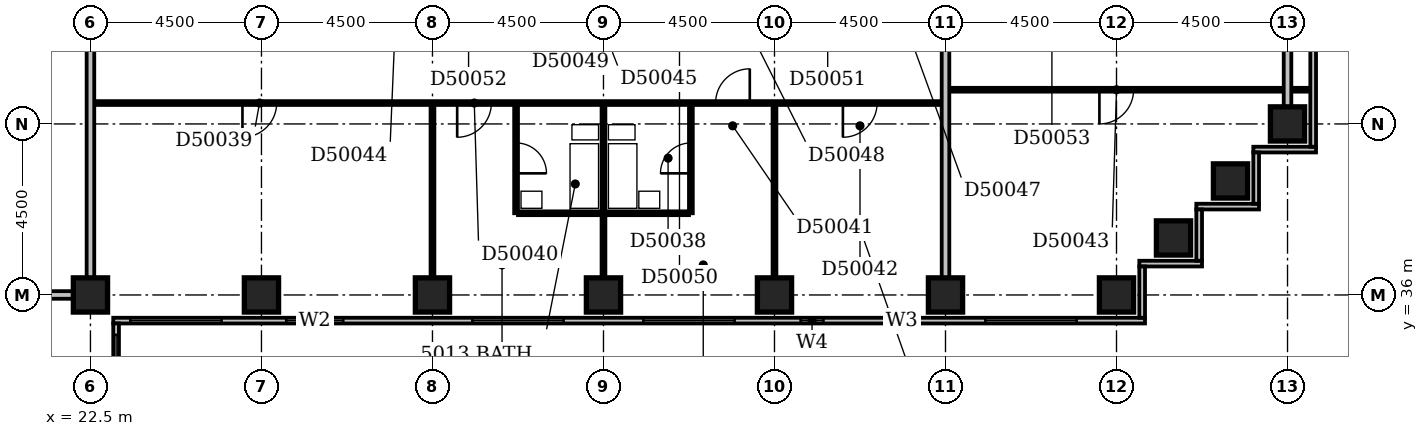
"""IFC4 building model, lengths in metres.
Left out: names, types, materials, properties, quantities, classifications, styles, units other than length and angle.
Written with IfcOpenShell. Run it as: python <this file> out.ifc"""

import sys

from ifc_helpers import new_model, si_unit, direction, frame, frame_2d, origin, origin_2d, place, context, subcontext, project, spatial, rectangle, extrude, element, fill, save


model = new_model("IFC4")
c1 = context("Model", 3, precision=1e-05, world=origin(), true_north=direction((0.0, 1.0)))
c2 = subcontext(c1, "Body", "Model", "MODEL_VIEW")
j1 = project(units=[si_unit("LENGTHUNIT", "METRE"), si_unit("PLANEANGLEUNIT", "RADIAN")], contexts=[c1])
p1 = place(None, origin())
s1 = spatial("IfcSite", under=j1, at=p1, CompositionType="ELEMENT")
p2 = place(p1, origin())
s2 = spatial("IfcBuilding", under=s1, at=p2, CompositionType="ELEMENT")
p3 = place(p2, frame((0.0, 0.0, 197.0)))
s3 = spatial("IfcBuildingStorey", under=s2, at=p3, CompositionType="ELEMENT", Elevation=197.0)
for number, where, z_axis, x_axis in (
    (1, (22.5, 36.0, -0.3), (0.0, 0.0, 1.0), (1.0, 0.0, 0.0)),
    (2, (27.0, 36.0, -0.3), (0.0, 0.0, 1.0), (1.0, 0.0, 0.0)),
    (3, (31.5, 36.0, -0.3), (0.0, 0.0, 1.0), (1.0, 0.0, 0.0)),
    (4, (36.0, 36.0, -0.3), (0.0, 0.0, 1.0), (1.0, 0.0, 0.0)),
    (5, (40.5, 36.0, -0.3), (0.0, 0.0, 1.0), (1.0, 0.0, 0.0)),
    (6, (45.0, 36.0, -0.3), (0.0, 0.0, 1.0), (1.0, 0.0, 0.0)),
    (7, (49.5, 36.0, -0.3), (0.0, 0.0, 1.0), (1.0, 0.0, 0.0)),
    (8, (51.0, 37.5, -0.3), (0.0, 0.0, 1.0), (1.0, 0.0, 0.0)),
    (9, (52.5, 39.0, -0.3), (0.0, 0.0, 1.0), (1.0, 0.0, 0.0)),
    (10, (54.0, 40.5, -0.3), (0.0, 0.0, 1.0), (1.0, 0.0, 0.0)),
):
    element("IfcColumn", number, at=place(p3, frame(where, z_axis=z_axis, x_axis=x_axis)), inside=s3, PredefinedType="COLUMN", context=c2, shape_type="SweptSolid", body=[
        extrude(rectangle(XDim=0.9, YDim=0.9, at=origin_2d()), origin(), (0.0, 0.0, 1.0), 3.6),
    ])
p4 = place(p3, frame((23.175, 17.4, 0.0), z_axis=(0.0, 0.0, 1.0), x_axis=(0.0, 1.0, 0.0)))
e11 = element("IfcWall", 11, at=p4, inside=s3, PredefinedType="STANDARD", context=c2, shape_type="SweptSolid", body=[
    extrude(rectangle(XDim=17.85, YDim=0.15, at=frame_2d((8.925, 0.0))), origin(), (0.0, 0.0, 1.0), 2.7),
])
p5 = place(p4, frame((1.65, 0.0, 0.6)))
e12 = element("IfcOpeningElement", 12, at=p5, cuts=e11, PredefinedType="OPENING", context=c2, shape_type="SweptSolid", body=[
    extrude(rectangle(XDim=2.4, YDim=1.8, at=frame_2d((1.2, 0.9))), frame((0.0, 0.087, 0.0), z_axis=(0.0, -1.0, 0.0), x_axis=(1.0, 0.0, 0.0)), (0.0, 0.0, 1.0), 0.174),
])
p6 = place(p4, frame((5.885, 0.0, 0.6)))
e13 = element("IfcOpeningElement", 13, at=p6, cuts=e11, PredefinedType="OPENING", context=c2, shape_type="SweptSolid", body=[
    extrude(rectangle(XDim=2.4, YDim=1.8, at=frame_2d((1.2, 0.9))), frame((0.0, 0.087, 0.0), z_axis=(0.0, -1.0, 0.0), x_axis=(1.0, 0.0, 0.0)), (0.0, 0.0, 1.0), 0.174),
])
p7 = place(p4, frame((10.65, 0.0, 0.6)))
e14 = element("IfcOpeningElement", 14, at=p7, cuts=e11, PredefinedType="OPENING", context=c2, shape_type="SweptSolid", body=[
    extrude(rectangle(XDim=2.4, YDim=1.8, at=frame_2d((1.2, 0.9))), frame((0.0, 0.087, 0.0), z_axis=(0.0, -1.0, 0.0), x_axis=(1.0, 0.0, 0.0)), (0.0, 0.0, 1.0), 0.174),
])
p8 = place(p4, frame((15.15, 0.0, 0.6)))
e15 = element("IfcOpeningElement", 15, at=p8, cuts=e11, PredefinedType="OPENING", context=c2, shape_type="SweptSolid", body=[
    extrude(rectangle(XDim=2.4, YDim=1.8, at=frame_2d((1.2, 0.9))), frame((0.0, 0.087, 0.0), z_axis=(0.0, -1.0, 0.0), x_axis=(1.0, 0.0, 0.0)), (0.0, 0.0, 1.0), 0.174),
])
p9 = place(p3, frame((23.1, 35.325, 0.0), z_axis=(0.0, 0.0, 1.0), x_axis=(1.0, 0.0, 0.0)))
e16 = element("IfcWall", 16, at=p9, inside=s3, PredefinedType="STANDARD", context=c2, shape_type="SweptSolid", body=[
    extrude(rectangle(XDim=27.15, YDim=0.15, at=frame_2d((13.575, 0.0))), origin(), (0.0, 0.0, 1.0), 2.7),
])
p10 = place(p9, frame((0.45, 0.0, 0.6)))
e17 = element("IfcOpeningElement", 17, at=p10, cuts=e16, PredefinedType="OPENING", context=c2, shape_type="SweptSolid", body=[
    extrude(rectangle(XDim=2.4, YDim=1.8, at=frame_2d((1.2, 0.9))), frame((0.0, 0.087, 0.0), z_axis=(0.0, -1.0, 0.0), x_axis=(1.0, 0.0, 0.0)), (0.0, 0.0, 1.0), 0.174),
])
p11 = place(p9, frame((4.552, 0.0, 0.6)))
e18 = element("IfcOpeningElement", 18, at=p11, cuts=e16, PredefinedType="OPENING", context=c2, shape_type="SweptSolid", body=[
    extrude(rectangle(XDim=1.5, YDim=1.8, at=frame_2d((0.75, 0.9))), frame((0.0, 0.087, 0.0), z_axis=(0.0, -1.0, 0.0), x_axis=(1.0, 0.0, 0.0)), (0.0, 0.0, 1.0), 0.174),
])
p12 = place(p9, frame((9.45, 0.0, 0.6)))
e19 = element("IfcOpeningElement", 19, at=p12, cuts=e16, PredefinedType="OPENING", context=c2, shape_type="SweptSolid", body=[
    extrude(rectangle(XDim=2.4, YDim=1.8, at=frame_2d((1.2, 0.9))), frame((0.0, 0.087, 0.0), z_axis=(0.0, -1.0, 0.0), x_axis=(1.0, 0.0, 0.0)), (0.0, 0.0, 1.0), 0.174),
])
p13 = place(p9, frame((13.95, 0.0, 0.6)))
e20 = element("IfcOpeningElement", 20, at=p13, cuts=e16, PredefinedType="OPENING", context=c2, shape_type="SweptSolid", body=[
    extrude(rectangle(XDim=2.4, YDim=1.8, at=frame_2d((1.2, 0.9))), frame((0.0, 0.087, 0.0), z_axis=(0.0, -1.0, 0.0), x_axis=(1.0, 0.0, 0.0)), (0.0, 0.0, 1.0), 0.174),
])
p14 = place(p9, frame((18.088, 0.0, 0.6)))
e21 = element("IfcOpeningElement", 21, at=p14, cuts=e16, PredefinedType="OPENING", context=c2, shape_type="SweptSolid", body=[
    extrude(rectangle(XDim=0.6, YDim=1.8, at=frame_2d((0.3, 0.9))), frame((0.0, 0.087, 0.0), z_axis=(0.0, -1.0, 0.0), x_axis=(1.0, 0.0, 0.0)), (0.0, 0.0, 1.0), 0.174),
])
p15 = place(p9, frame((20.301, 0.0, 0.6)))
e22 = element("IfcOpeningElement", 22, at=p15, cuts=e16, PredefinedType="OPENING", context=c2, shape_type="SweptSolid", body=[
    extrude(rectangle(XDim=0.9, YDim=1.8, at=frame_2d((0.45, 0.9))), frame((0.0, 0.087, 0.0), z_axis=(0.0, -1.0, 0.0), x_axis=(1.0, 0.0, 0.0)), (0.0, 0.0, 1.0), 0.174),
])
p16 = place(p9, frame((22.95, 0.0, 0.6)))
e23 = element("IfcOpeningElement", 23, at=p16, cuts=e16, PredefinedType="OPENING", context=c2, shape_type="SweptSolid", body=[
    extrude(rectangle(XDim=2.4, YDim=1.8, at=frame_2d((1.2, 0.9))), frame((0.0, 0.087, 0.0), z_axis=(0.0, -1.0, 0.0), x_axis=(1.0, 0.0, 0.0)), (0.0, 0.0, 1.0), 0.174),
])
p17 = place(p3, frame((50.175, 35.4, 0.0), z_axis=(0.0, 0.0, 1.0), x_axis=(0.0, 1.0, 0.0)))
e24 = element("IfcWall", 24, at=p17, inside=s3, PredefinedType="STANDARD", context=c2, shape_type="SweptSolid", body=[
    extrude(rectangle(XDim=1.35, YDim=0.15, at=frame_2d((0.675, 0.0))), origin(), (0.0, 0.0, 1.0), 2.7),
])
p18 = place(p3, frame((50.1, 36.825, 0.0), z_axis=(0.0, 0.0, 1.0), x_axis=(1.0, 0.0, 0.0)))
e25 = element("IfcWall", 25, at=p18, inside=s3, PredefinedType="STANDARD", context=c2, shape_type="SweptSolid", body=[
    extrude(rectangle(XDim=1.65, YDim=0.15, at=frame_2d((0.825, 0.0))), origin(), (0.0, 0.0, 1.0), 2.7),
])
p19 = place(p3, frame((51.675, 36.9, 0.0), z_axis=(0.0, 0.0, 1.0), x_axis=(0.0, 1.0, 0.0)))
e26 = element("IfcWall", 26, at=p19, inside=s3, PredefinedType="STANDARD", context=c2, shape_type="SweptSolid", body=[
    extrude(rectangle(XDim=1.35, YDim=0.15, at=frame_2d((0.675, 0.0))), origin(), (0.0, 0.0, 1.0), 2.7),
])
p20 = place(p3, frame((51.6, 38.325, 0.0), z_axis=(0.0, 0.0, 1.0), x_axis=(1.0, 0.0, 0.0)))
e27 = element("IfcWall", 27, at=p20, inside=s3, PredefinedType="STANDARD", context=c2, shape_type="SweptSolid", body=[
    extrude(rectangle(XDim=1.65, YDim=0.15, at=frame_2d((0.825, 0.0))), origin(), (0.0, 0.0, 1.0), 2.7),
])
p21 = place(p3, frame((53.175, 38.4, 0.0), z_axis=(0.0, 0.0, 1.0), x_axis=(0.0, 1.0, 0.0)))
e28 = element("IfcWall", 28, at=p21, inside=s3, PredefinedType="STANDARD", context=c2, shape_type="SweptSolid", body=[
    extrude(rectangle(XDim=1.35, YDim=0.15, at=frame_2d((0.675, 0.0))), origin(), (0.0, 0.0, 1.0), 2.7),
])
p22 = place(p3, frame((53.1, 39.825, 0.0), z_axis=(0.0, 0.0, 1.0), x_axis=(1.0, 0.0, 0.0)))
e29 = element("IfcWall", 29, at=p22, inside=s3, PredefinedType="STANDARD", context=c2, shape_type="SweptSolid", body=[
    extrude(rectangle(XDim=1.65, YDim=0.15, at=frame_2d((0.825, 0.0))), origin(), (0.0, 0.0, 1.0), 2.7),
])
p23 = place(p3, frame((54.675, 39.9, 0.0), z_axis=(0.0, 0.0, 1.0), x_axis=(0.0, 1.0, 0.0)))
e30 = element("IfcWall", 30, at=p23, inside=s3, PredefinedType="STANDARD", context=c2, shape_type="SweptSolid", body=[
    extrude(rectangle(XDim=14.85, YDim=0.15, at=frame_2d((7.425, 0.0))), origin(), (0.0, 0.0, 1.0), 2.7),
])
p24 = place(p23, frame((5.848, 0.0, 0.6)))
e31 = element("IfcOpeningElement", 31, at=p24, cuts=e30, PredefinedType="OPENING", context=c2, shape_type="SweptSolid", body=[
    extrude(rectangle(XDim=0.6, YDim=1.8, at=frame_2d((0.3, 0.9))), frame((0.0, 0.087, 0.0), z_axis=(0.0, -1.0, 0.0), x_axis=(1.0, 0.0, 0.0)), (0.0, 0.0, 1.0), 0.174),
])
p25 = place(p23, frame((8.226, 0.0, 0.6)))
e32 = element("IfcOpeningElement", 32, at=p25, cuts=e30, PredefinedType="OPENING", context=c2, shape_type="SweptSolid", body=[
    extrude(rectangle(XDim=0.6, YDim=1.8, at=frame_2d((0.3, 0.9))), frame((0.0, 0.087, 0.0), z_axis=(0.0, -1.0, 0.0), x_axis=(1.0, 0.0, 0.0)), (0.0, 0.0, 1.0), 0.174),
])
p26 = place(p3, frame((9.1, 36.0, 0.0), z_axis=(0.0, 0.0, 1.0), x_axis=(1.0, 0.0, 0.0)))
e33 = element("IfcWall", 33, at=p26, inside=s3, PredefinedType="PARTITIONING", context=c2, shape_type="SweptSolid", body=[
    extrude(rectangle(XDim=12.95, YDim=0.2, at=frame_2d((6.475, 0.0))), origin(), (0.0, 0.0, 1.0), 3.3),
])
p27 = place(p3, frame((22.5, 36.45, 0.0), z_axis=(0.0, 0.0, 1.0), x_axis=(0.0, 1.0, 0.0)))
e34 = element("IfcWall", 34, at=p27, inside=s3, PredefinedType="PARTITIONING", context=c2, shape_type="SweptSolid", body=[
    extrude(rectangle(XDim=13.05, YDim=0.2, at=frame_2d((6.525, 0.0))), origin(), (0.0, 0.0, 1.0), 3.3),
])
p28 = place(p3, frame((31.5, 36.45, 0.0), z_axis=(0.0, 0.0, 1.0), x_axis=(0.0, 1.0, 0.0)))
e35 = element("IfcWall", 35, at=p28, inside=s3, PredefinedType="PARTITIONING", context=c2, shape_type="SweptSolid", body=[
    extrude(rectangle(XDim=4.55, YDim=0.1, at=frame_2d((2.275, 0.0))), origin(), (0.0, 0.0, 1.0), 3.3),
])
p29 = place(p3, frame((36.0, 36.45, 0.0), z_axis=(0.0, 0.0, 1.0), x_axis=(0.0, 1.0, 0.0)))
e36 = element("IfcWall", 36, at=p29, inside=s3, PredefinedType="PARTITIONING", context=c2, shape_type="SweptSolid", body=[
    extrude(rectangle(XDim=4.55, YDim=0.1, at=frame_2d((2.275, 0.0))), origin(), (0.0, 0.0, 1.0), 2.4),
])
p30 = place(p3, frame((40.5, 36.45, 0.0), z_axis=(0.0, 0.0, 1.0), x_axis=(0.0, 1.0, 0.0)))
e37 = element("IfcWall", 37, at=p30, inside=s3, PredefinedType="PARTITIONING", context=c2, shape_type="SweptSolid", body=[
    extrude(rectangle(XDim=4.55, YDim=0.1, at=frame_2d((2.275, 0.0))), origin(), (0.0, 0.0, 1.0), 3.3),
])
p31 = place(p3, frame((45.0, 36.45, 0.0), z_axis=(0.0, 0.0, 1.0), x_axis=(0.0, 1.0, 0.0)))
e38 = element("IfcWall", 38, at=p31, inside=s3, PredefinedType="PARTITIONING", context=c2, shape_type="SweptSolid", body=[
    extrude(rectangle(XDim=12.95, YDim=0.2, at=frame_2d((6.475, 0.0))), origin(), (0.0, 0.0, 1.0), 2.6),
])
p32 = place(p3, frame((33.7, 38.15, 0.0), z_axis=(0.0, 0.0, 1.0), x_axis=(0.0, 1.0, 0.0)))
e39 = element("IfcWall", 39, at=p32, inside=s3, PredefinedType="PLUMBINGWALL", context=c2, shape_type="SweptSolid", body=[
    extrude(rectangle(XDim=2.85, YDim=0.1, at=frame_2d((1.425, 0.0))), origin(), (0.0, 0.0, 1.0), 3.3),
])
p33 = place(p32, frame((1.05, 0.0, 0.0)))
e40 = element("IfcOpeningElement", 40, at=p33, cuts=e39, PredefinedType="OPENING", context=c2, shape_type="SweptSolid", body=[
    extrude(rectangle(XDim=0.8, YDim=2.1, at=frame_2d((0.4, 1.05))), frame((0.0, 0.062, 0.0), z_axis=(0.0, -1.0, 0.0), x_axis=(1.0, 0.0, 0.0)), (0.0, 0.0, 1.0), 0.124),
])
p34 = place(p3, frame((33.75, 38.15, 0.0), z_axis=(0.0, 0.0, 1.0), x_axis=(1.0, 0.0, 0.0)))
e41 = element("IfcWall", 41, at=p34, inside=s3, PredefinedType="PLUMBINGWALL", context=c2, shape_type="SweptSolid", body=[
    extrude(rectangle(XDim=4.5, YDim=0.1, at=frame_2d((2.25, 0.0))), origin(), (0.0, 0.0, 1.0), 3.3),
])
p35 = place(p3, frame((38.3, 38.15, 0.0), z_axis=(0.0, 0.0, 1.0), x_axis=(0.0, 1.0, 0.0)))
e42 = element("IfcWall", 42, at=p35, inside=s3, PredefinedType="PLUMBINGWALL", context=c2, shape_type="SweptSolid", body=[
    extrude(rectangle(XDim=2.85, YDim=0.1, at=frame_2d((1.425, 0.0))), origin(), (0.0, 0.0, 1.0), 3.3),
])
p36 = place(p35, frame((1.05, 0.0, 0.0)))
e43 = element("IfcOpeningElement", 43, at=p36, cuts=e42, PredefinedType="OPENING", context=c2, shape_type="SweptSolid", body=[
    extrude(rectangle(XDim=0.8, YDim=2.1, at=frame_2d((0.4, 1.05))), frame((0.0, 0.062, 0.0), z_axis=(0.0, -1.0, 0.0), x_axis=(1.0, 0.0, 0.0)), (0.0, 0.0, 1.0), 0.124),
])
p37 = place(p3, frame((54.0, 40.95, 0.0), z_axis=(0.0, 0.0, 1.0), x_axis=(0.0, 1.0, 0.0)))
e44 = element("IfcWall", 44, at=p37, inside=s3, PredefinedType="PARTITIONING", context=c2, shape_type="SweptSolid", body=[
    extrude(rectangle(XDim=8.1, YDim=0.2, at=frame_2d((4.05, 0.0))), origin(), (0.0, 0.0, 1.0), 2.7),
])
p38 = place(p3, frame((22.6, 41.05, 0.0), z_axis=(0.0, 0.0, 1.0), x_axis=(1.0, 0.0, 0.0)))
e45 = element("IfcWall", 45, at=p38, inside=s3, PredefinedType="PARTITIONING", context=c2, shape_type="SweptSolid", body=[
    extrude(rectangle(XDim=22.3, YDim=0.1, at=frame_2d((11.15, 0.0))), origin(), (0.0, 0.0, 1.0), 3.3),
])
p39 = place(p38, frame((3.9, 0.0, 0.0)))
e46 = element("IfcOpeningElement", 46, at=p39, cuts=e45, PredefinedType="OPENING", context=c2, shape_type="SweptSolid", body=[
    extrude(rectangle(XDim=0.9, YDim=2.1, at=frame_2d((0.45, 1.05))), frame((0.0, 0.062, 0.0), z_axis=(0.0, -1.0, 0.0), x_axis=(1.0, 0.0, 0.0)), (0.0, 0.0, 1.0), 0.124),
])
p40 = place(p38, frame((9.55, 0.0, 0.0)))
e47 = element("IfcOpeningElement", 47, at=p40, cuts=e45, PredefinedType="OPENING", context=c2, shape_type="SweptSolid", body=[
    extrude(rectangle(XDim=0.9, YDim=2.1, at=frame_2d((0.45, 1.05))), frame((0.0, 0.062, 0.0), z_axis=(0.0, -1.0, 0.0), x_axis=(1.0, 0.0, 0.0)), (0.0, 0.0, 1.0), 0.124),
])
p41 = place(p38, frame((16.35, 0.0, 0.0)))
e48 = element("IfcOpeningElement", 48, at=p41, cuts=e45, PredefinedType="OPENING", context=c2, shape_type="SweptSolid", body=[
    extrude(rectangle(XDim=0.9, YDim=2.1, at=frame_2d((0.45, 1.05))), frame((0.0, 0.062, 0.0), z_axis=(0.0, -1.0, 0.0), x_axis=(1.0, 0.0, 0.0)), (0.0, 0.0, 1.0), 0.124),
])
p42 = place(p38, frame((19.7, 0.0, 0.0)))
e49 = element("IfcOpeningElement", 49, at=p42, cuts=e45, PredefinedType="OPENING", context=c2, shape_type="SweptSolid", body=[
    extrude(rectangle(XDim=0.9, YDim=2.1, at=frame_2d((0.45, 1.05))), frame((0.0, 0.062, 0.0), z_axis=(0.0, -1.0, 0.0), x_axis=(1.0, 0.0, 0.0)), (0.0, 0.0, 1.0), 0.124),
])
p43 = place(p3, frame((45.1, 41.4, 0.0), z_axis=(0.0, 0.0, 1.0), x_axis=(1.0, 0.0, 0.0)))
e50 = element("IfcWall", 50, at=p43, inside=s3, PredefinedType="PARTITIONING", context=c2, shape_type="SweptSolid", body=[
    extrude(rectangle(XDim=9.5, YDim=0.1, at=frame_2d((4.75, 0.0))), origin(), (0.0, 0.0, 1.0), 3.3),
])
p44 = place(p43, frame((3.95, 0.0, 0.0)))
e51 = element("IfcOpeningElement", 51, at=p44, cuts=e50, PredefinedType="OPENING", context=c2, shape_type="SweptSolid", body=[
    extrude(rectangle(XDim=0.9, YDim=2.1, at=frame_2d((0.45, 1.05))), frame((0.0, 0.062, 0.0), z_axis=(0.0, -1.0, 0.0), x_axis=(1.0, 0.0, 0.0)), (0.0, 0.0, 1.0), 0.124),
])
p45 = place(p8, origin())
e52 = element("IfcWindow", 52, at=p45, inside=s3, PartitioningType="SINGLE_PANEL", PredefinedType="WINDOW", context=c2, shape_type="SweptSolid", body=[
    extrude(rectangle(XDim=2.4, YDim=1.8, at=frame_2d((1.2, 0.9))), frame((0.0, 0.03, 0.0), z_axis=(0.0, -1.0, 0.0), x_axis=(1.0, 0.0, 0.0)), (0.0, 0.0, 1.0), 0.06),
])
fill(e15, e52)
p46 = place(p10, origin())
e53 = element("IfcWindow", 53, at=p46, inside=s3, PartitioningType="SINGLE_PANEL", PredefinedType="WINDOW", context=c2, shape_type="SweptSolid", body=[
    extrude(rectangle(XDim=2.4, YDim=1.8, at=frame_2d((1.2, 0.9))), frame((0.0, 0.03, 0.0), z_axis=(0.0, -1.0, 0.0), x_axis=(1.0, 0.0, 0.0)), (0.0, 0.0, 1.0), 0.06),
])
fill(e17, e53)
p47 = place(p11, origin())
e54 = element("IfcWindow", 54, at=p47, inside=s3, PartitioningType="SINGLE_PANEL", PredefinedType="WINDOW", context=c2, shape_type="SweptSolid", body=[
    extrude(rectangle(XDim=1.5, YDim=1.8, at=frame_2d((0.75, 0.9))), frame((0.0, 0.03, 0.0), z_axis=(0.0, -1.0, 0.0), x_axis=(1.0, 0.0, 0.0)), (0.0, 0.0, 1.0), 0.06),
])
fill(e18, e54)
p48 = place(p12, origin())
e55 = element("IfcWindow", 55, at=p48, inside=s3, PartitioningType="SINGLE_PANEL", PredefinedType="WINDOW", context=c2, shape_type="SweptSolid", body=[
    extrude(rectangle(XDim=2.4, YDim=1.8, at=frame_2d((1.2, 0.9))), frame((0.0, 0.03, 0.0), z_axis=(0.0, -1.0, 0.0), x_axis=(1.0, 0.0, 0.0)), (0.0, 0.0, 1.0), 0.06),
])
fill(e19, e55)
p49 = place(p13, origin())
e56 = element("IfcWindow", 56, at=p49, inside=s3, PartitioningType="SINGLE_PANEL", PredefinedType="WINDOW", context=c2, shape_type="SweptSolid", body=[
    extrude(rectangle(XDim=2.4, YDim=1.8, at=frame_2d((1.2, 0.9))), frame((0.0, 0.03, 0.0), z_axis=(0.0, -1.0, 0.0), x_axis=(1.0, 0.0, 0.0)), (0.0, 0.0, 1.0), 0.06),
])
fill(e20, e56)
p50 = place(p14, origin())
e57 = element("IfcWindow", 57, at=p50, inside=s3, PartitioningType="SINGLE_PANEL", PredefinedType="WINDOW", context=c2, shape_type="SweptSolid", body=[
    extrude(rectangle(XDim=0.6, YDim=1.8, at=frame_2d((0.3, 0.9))), frame((0.0, 0.03, 0.0), z_axis=(0.0, -1.0, 0.0), x_axis=(1.0, 0.0, 0.0)), (0.0, 0.0, 1.0), 0.06),
])
fill(e21, e57)
p51 = place(p15, origin())
e58 = element("IfcWindow", 58, at=p51, inside=s3, PartitioningType="SINGLE_PANEL", PredefinedType="WINDOW", context=c2, shape_type="SweptSolid", body=[
    extrude(rectangle(XDim=0.9, YDim=1.8, at=frame_2d((0.45, 0.9))), frame((0.0, 0.03, 0.0), z_axis=(0.0, -1.0, 0.0), x_axis=(1.0, 0.0, 0.0)), (0.0, 0.0, 1.0), 0.06),
])
fill(e22, e58)
p52 = place(p16, origin())
e59 = element("IfcWindow", 59, at=p52, inside=s3, PartitioningType="SINGLE_PANEL", PredefinedType="WINDOW", context=c2, shape_type="SweptSolid", body=[
    extrude(rectangle(XDim=2.4, YDim=1.8, at=frame_2d((1.2, 0.9))), frame((0.0, 0.03, 0.0), z_axis=(0.0, -1.0, 0.0), x_axis=(1.0, 0.0, 0.0)), (0.0, 0.0, 1.0), 0.06),
])
fill(e23, e59)
p53 = place(p33, frame((0.8, 0.0, 0.0), z_axis=(0.0, 0.0, 1.0), x_axis=(-1.0, 0.0, 0.0)))
e60 = element("IfcDoor", 60, at=p53, inside=s3, OperationType="SINGLE_SWING_RIGHT", PredefinedType="DOOR", context=c2, shape_type="SweptSolid", body=[
    extrude(rectangle(XDim=0.8, YDim=2.1, at=frame_2d((0.4, 1.05))), frame((0.0, 0.025, 0.0), z_axis=(0.0, -1.0, 0.0), x_axis=(1.0, 0.0, 0.0)), (0.0, 0.0, 1.0), 0.05),
])
fill(e40, e60)
p54 = place(p36, origin())
e61 = element("IfcDoor", 61, at=p54, inside=s3, OperationType="SINGLE_SWING_LEFT", PredefinedType="DOOR", context=c2, shape_type="SweptSolid", body=[
    extrude(rectangle(XDim=0.8, YDim=2.1, at=frame_2d((0.4, 1.05))), frame((0.0, 0.025, 0.0), z_axis=(0.0, -1.0, 0.0), x_axis=(1.0, 0.0, 0.0)), (0.0, 0.0, 1.0), 0.05),
])
fill(e43, e61)
p55 = place(p39, frame((0.9, 0.0, 0.0), z_axis=(0.0, 0.0, 1.0), x_axis=(-1.0, 0.0, 0.0)))
e62 = element("IfcDoor", 62, at=p55, inside=s3, OperationType="SINGLE_SWING_RIGHT", PredefinedType="DOOR", context=c2, shape_type="SweptSolid", body=[
    extrude(rectangle(XDim=0.9, YDim=2.1, at=frame_2d((0.45, 1.05))), frame((0.0, 0.025, 0.0), z_axis=(0.0, -1.0, 0.0), x_axis=(1.0, 0.0, 0.0)), (0.0, 0.0, 1.0), 0.05),
])
fill(e46, e62)
p56 = place(p40, frame((0.9, 0.0, 0.0), z_axis=(0.0, 0.0, 1.0), x_axis=(-1.0, 0.0, 0.0)))
e63 = element("IfcDoor", 63, at=p56, inside=s3, OperationType="SINGLE_SWING_RIGHT", PredefinedType="DOOR", context=c2, shape_type="SweptSolid", body=[
    extrude(rectangle(XDim=0.9, YDim=2.1, at=frame_2d((0.45, 1.05))), frame((0.0, 0.025, 0.0), z_axis=(0.0, -1.0, 0.0), x_axis=(1.0, 0.0, 0.0)), (0.0, 0.0, 1.0), 0.05),
])
fill(e47, e63)
p57 = place(p41, frame((0.9, 0.0, 0.0), z_axis=(0.0, 0.0, 1.0), x_axis=(-1.0, 0.0, 0.0)))
e64 = element("IfcDoor", 64, at=p57, inside=s3, OperationType="SINGLE_SWING_LEFT", PredefinedType="DOOR", context=c2, shape_type="SweptSolid", body=[
    extrude(rectangle(XDim=0.9, YDim=2.1, at=frame_2d((0.45, 1.05))), frame((0.0, 0.025, 0.0), z_axis=(0.0, -1.0, 0.0), x_axis=(1.0, 0.0, 0.0)), (0.0, 0.0, 1.0), 0.05),
])
fill(e48, e64)
p58 = place(p42, frame((0.9, 0.0, 0.0), z_axis=(0.0, 0.0, 1.0), x_axis=(-1.0, 0.0, 0.0)))
e65 = element("IfcDoor", 65, at=p58, inside=s3, OperationType="SINGLE_SWING_RIGHT", PredefinedType="DOOR", context=c2, shape_type="SweptSolid", body=[
    extrude(rectangle(XDim=0.9, YDim=2.1, at=frame_2d((0.45, 1.05))), frame((0.0, 0.025, 0.0), z_axis=(0.0, -1.0, 0.0), x_axis=(1.0, 0.0, 0.0)), (0.0, 0.0, 1.0), 0.05),
])
fill(e49, e65)
p59 = place(p44, frame((0.9, 0.0, 0.0), z_axis=(0.0, 0.0, 1.0), x_axis=(-1.0, 0.0, 0.0)))
e66 = element("IfcDoor", 66, at=p59, inside=s3, OperationType="SINGLE_SWING_RIGHT", PredefinedType="DOOR", context=c2, shape_type="SweptSolid", body=[
    extrude(rectangle(XDim=0.9, YDim=2.1, at=frame_2d((0.45, 1.05))), frame((0.0, 0.025, 0.0), z_axis=(0.0, -1.0, 0.0), x_axis=(1.0, 0.0, 0.0)), (0.0, 0.0, 1.0), 0.05),
])
fill(e51, e66)
save(model, sys.argv[1])
